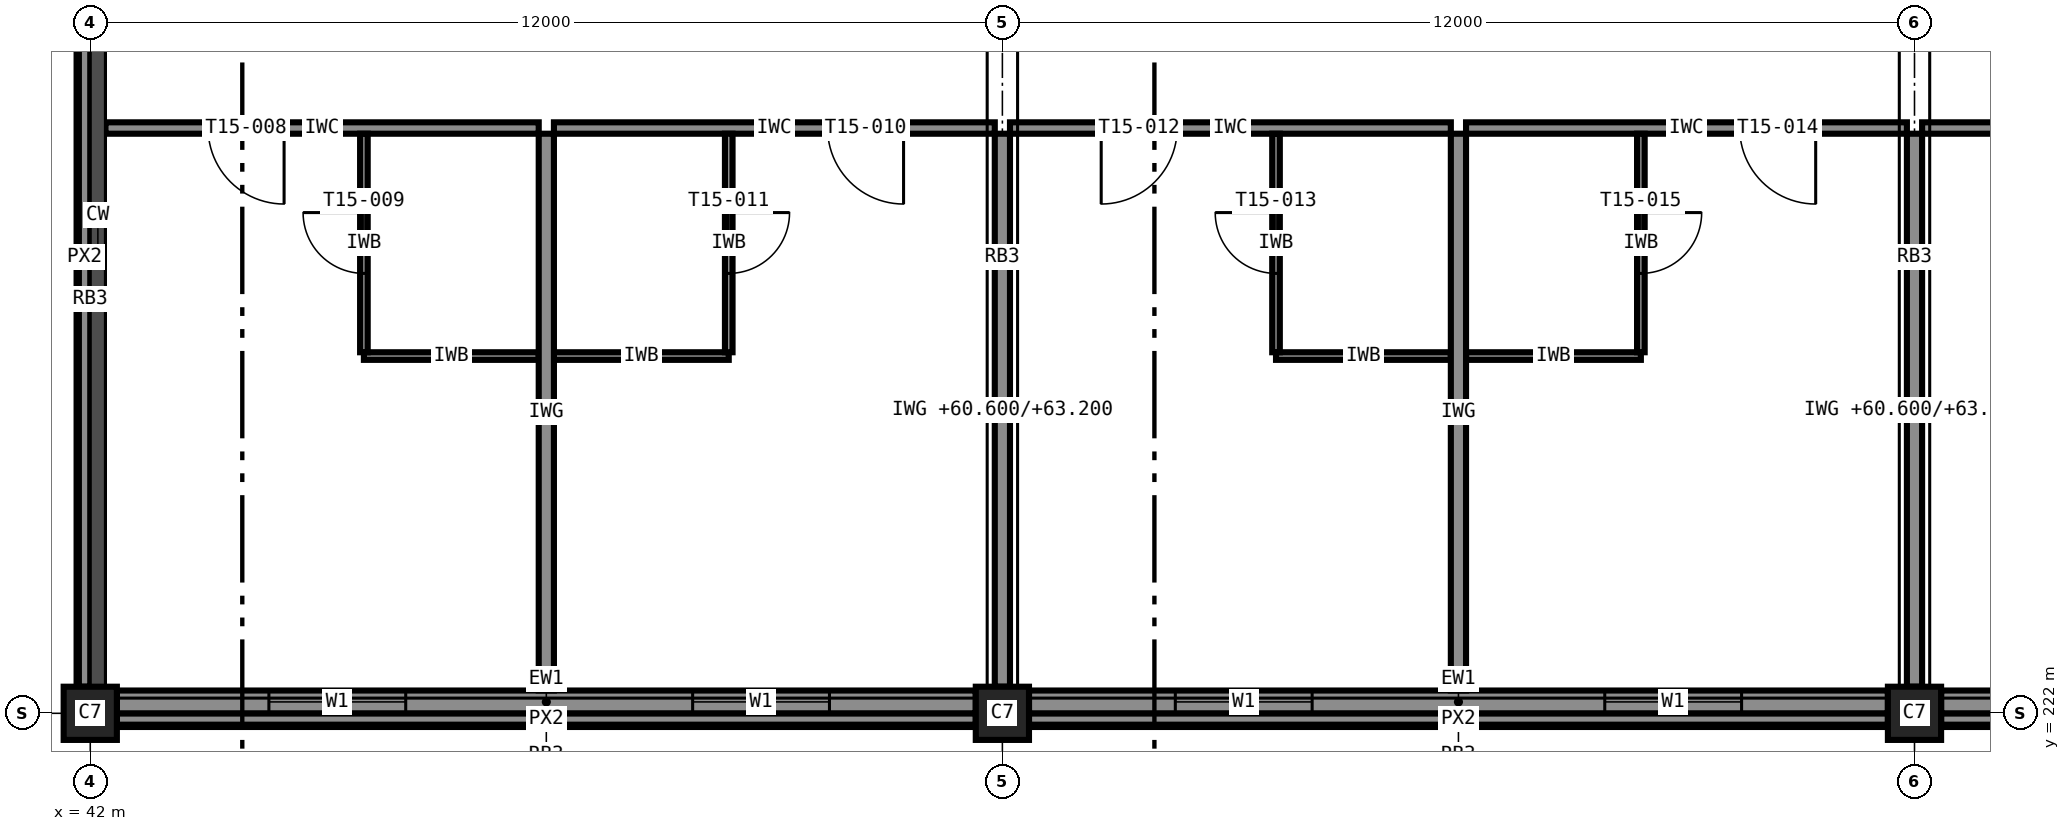
"""IFC4 building model, lengths in metres.
Left out: names, types, materials, properties, quantities, classifications, styles, units other than length and angle.
Written with IfcOpenShell. Run it as: python <this file> out.ifc"""

import sys

from ifc_helpers import new_model, si_unit, direction, frame, frame_2d, origin, origin_2d, place, context, subcontext, project, spatial, rectangle, extrude, element, fill, save


model = new_model("IFC4")
c1 = context("Model", 3, precision=1e-05, world=origin(), true_north=direction((0.0, 1.0)))
c2 = subcontext(c1, "Body", "Model", "MODEL_VIEW")
j1 = project(units=[si_unit("LENGTHUNIT", "METRE"), si_unit("PLANEANGLEUNIT", "RADIAN")], contexts=[c1])
p1 = place(None, origin())
s1 = spatial("IfcSite", under=j1, at=p1, CompositionType="ELEMENT")
p2 = place(p1, origin())
s2 = spatial("IfcBuilding", under=s1, at=p2, CompositionType="ELEMENT")
p3 = place(p2, frame((0.0, 0.0, 60.6)))
s3 = spatial("IfcBuildingStorey", under=s2, at=p3, CompositionType="ELEMENT", Elevation=60.6)
for number, where, z_axis, x_axis in (
    (1, (42.0, 222.0, 0.0), (0.0, 0.0, 1.0), (1.0, 0.0, 0.0)),
    (2, (54.0, 222.0, 0.0), (0.0, 0.0, 1.0), (1.0, 0.0, 0.0)),
    (3, (66.0, 222.0, 0.0), (0.0, 0.0, 1.0), (1.0, 0.0, 0.0)),
):
    element("IfcColumn", number, at=place(p3, frame(where, z_axis=z_axis, x_axis=x_axis)), inside=s3, PredefinedType="COLUMN", context=c2, shape_type="SweptSolid", body=[
        extrude(rectangle(XDim=0.7, YDim=0.7, at=origin_2d()), origin(), (0.0, 0.0, 1.0), 3.6),
    ])
p4 = place(p3, frame((42.35, 222.15, 0.0), z_axis=(0.0, 0.0, 1.0), x_axis=(1.0, 0.0, 0.0)))
e4 = element("IfcWall", 4, at=p4, inside=s3, PredefinedType="STANDARD", context=c2, shape_type="SweptSolid", body=[
    extrude(rectangle(XDim=11.3, YDim=0.3, at=frame_2d((5.65, 0.0))), origin(), (0.0, 0.0, 1.0), 2.6),
])
p5 = place(p4, frame((2.0, 0.0, 0.85)))
e5 = element("IfcOpeningElement", 5, at=p5, cuts=e4, PredefinedType="OPENING", context=c2, shape_type="SweptSolid", body=[
    extrude(rectangle(XDim=1.8, YDim=1.75, at=frame_2d((0.9, 0.875))), frame((0.0, 0.16, 0.0), z_axis=(0.0, -1.0, 0.0), x_axis=(1.0, 0.0, 0.0)), (0.0, 0.0, 1.0), 0.32),
])
p6 = place(p4, frame((7.575, 0.0, 0.85)))
e6 = element("IfcOpeningElement", 6, at=p6, cuts=e4, PredefinedType="OPENING", context=c2, shape_type="SweptSolid", body=[
    extrude(rectangle(XDim=1.8, YDim=1.75, at=frame_2d((0.9, 0.875))), frame((0.0, 0.16, 0.0), z_axis=(0.0, -1.0, 0.0), x_axis=(1.0, 0.0, 0.0)), (0.0, 0.0, 1.0), 0.32),
])
p7 = place(p3, frame((54.35, 222.15, 0.0), z_axis=(0.0, 0.0, 1.0), x_axis=(1.0, 0.0, 0.0)))
e7 = element("IfcWall", 7, at=p7, inside=s3, PredefinedType="STANDARD", context=c2, shape_type="SweptSolid", body=[
    extrude(rectangle(XDim=11.3, YDim=0.3, at=frame_2d((5.65, 0.0))), origin(), (0.0, 0.0, 1.0), 2.6),
])
p8 = place(p7, frame((1.925, 0.0, 0.85)))
e8 = element("IfcOpeningElement", 8, at=p8, cuts=e7, PredefinedType="OPENING", context=c2, shape_type="SweptSolid", body=[
    extrude(rectangle(XDim=1.8, YDim=1.75, at=frame_2d((0.9, 0.875))), frame((0.0, 0.16, 0.0), z_axis=(0.0, -1.0, 0.0), x_axis=(1.0, 0.0, 0.0)), (0.0, 0.0, 1.0), 0.32),
])
p9 = place(p7, frame((7.575, 0.0, 0.85)))
e9 = element("IfcOpeningElement", 9, at=p9, cuts=e7, PredefinedType="OPENING", context=c2, shape_type="SweptSolid", body=[
    extrude(rectangle(XDim=1.8, YDim=1.75, at=frame_2d((0.9, 0.875))), frame((0.0, 0.16, 0.0), z_axis=(0.0, -1.0, 0.0), x_axis=(1.0, 0.0, 0.0)), (0.0, 0.0, 1.0), 0.32),
])
p10 = place(p3, frame((66.35, 222.15, 0.0), z_axis=(0.0, 0.0, 1.0), x_axis=(1.0, 0.0, 0.0)))
e10 = element("IfcWall", 10, at=p10, inside=s3, PredefinedType="STANDARD", context=c2, shape_type="SweptSolid", body=[
    extrude(rectangle(XDim=11.3, YDim=0.3, at=frame_2d((5.65, 0.0))), origin(), (0.0, 0.0, 1.0), 2.6),
])
p11 = place(p10, frame((1.925, 0.0, 0.85)))
e11 = element("IfcOpeningElement", 11, at=p11, cuts=e10, PredefinedType="OPENING", context=c2, shape_type="SweptSolid", body=[
    extrude(rectangle(XDim=1.8, YDim=1.75, at=frame_2d((0.9, 0.875))), frame((0.0, 0.16, 0.0), z_axis=(0.0, -1.0, 0.0), x_axis=(1.0, 0.0, 0.0)), (0.0, 0.0, 1.0), 0.32),
])
p12 = place(p10, frame((7.575, 0.0, 0.85)))
e12 = element("IfcOpeningElement", 12, at=p12, cuts=e10, PredefinedType="OPENING", context=c2, shape_type="SweptSolid", body=[
    extrude(rectangle(XDim=1.8, YDim=1.75, at=frame_2d((0.9, 0.875))), frame((0.0, 0.16, 0.0), z_axis=(0.0, -1.0, 0.0), x_axis=(1.0, 0.0, 0.0)), (0.0, 0.0, 1.0), 0.32),
])
for number, where, z_axis, x_axis in (
    (13, (42.35, 221.925, 3.4), (0.0, 0.0, 1.0), (1.0, 0.0, 0.0)),
    (14, (54.35, 221.925, 3.4), (0.0, 0.0, 1.0), (1.0, 0.0, 0.0)),
    (15, (66.35, 221.925, 3.4), (0.0, 0.0, 1.0), (1.0, 0.0, 0.0)),
    (16, (41.925, 233.65, 3.4), (0.0, 0.0, 1.0), (0.0, -1.0, 0.0)),
):
    element("IfcWall", number, at=place(p3, frame(where, z_axis=z_axis, x_axis=x_axis)), inside=s3, PredefinedType="STANDARD", context=c2, shape_type="SweptSolid", body=[
        extrude(rectangle(XDim=11.3, YDim=0.15, at=frame_2d((5.65, 0.0))), origin(), (0.0, 0.0, 1.0), 0.2),
    ])
p13 = place(p3, frame((47.9, 229.7, 0.0), z_axis=(0.0, 0.0, 1.0), x_axis=(-1.0, 0.0, 0.0)))
e17 = element("IfcWall", 17, at=p13, inside=s3, PredefinedType="PARTITIONING", context=c2, shape_type="SweptSolid", body=[
    extrude(rectangle(XDim=5.7, YDim=0.15, at=frame_2d((2.85, 0.0))), origin(), (0.0, 0.0, 1.0), 3.4),
])
p14 = place(p13, frame((3.35, 0.0, 0.0)))
e18 = element("IfcOpeningElement", 18, at=p14, cuts=e17, PredefinedType="OPENING", context=c2, shape_type="SweptSolid", body=[
    extrude(rectangle(XDim=1.0, YDim=2.1, at=frame_2d((0.5, 1.05))), frame((0.0, 0.085, 0.0), z_axis=(0.0, -1.0, 0.0), x_axis=(1.0, 0.0, 0.0)), (0.0, 0.0, 1.0), 0.17),
])
p15 = place(p3, frame((45.6, 226.7, 0.0), z_axis=(0.0, 0.0, 1.0), x_axis=(1.0, 0.0, 0.0)))
e19 = element("IfcWall", 19, at=p15, inside=s3, PredefinedType="PARTITIONING", context=c2, shape_type="SweptSolid", body=[
    extrude(rectangle(XDim=2.3, YDim=0.1, at=frame_2d((1.15, 0.0))), origin(), (0.0, 0.0, 1.0), 3.4),
])
p16 = place(p3, frame((45.6, 226.75, 0.0), z_axis=(0.0, 0.0, 1.0), x_axis=(0.0, 1.0, 0.0)))
e20 = element("IfcWall", 20, at=p16, inside=s3, PredefinedType="PARTITIONING", context=c2, shape_type="SweptSolid", body=[
    extrude(rectangle(XDim=2.875, YDim=0.1, at=frame_2d((1.438, 0.0))), origin(), (0.0, 0.0, 1.0), 3.4),
])
p17 = place(p16, frame((1.038, 0.0, 0.0)))
e21 = element("IfcOpeningElement", 21, at=p17, cuts=e20, PredefinedType="OPENING", context=c2, shape_type="SweptSolid", body=[
    extrude(rectangle(XDim=0.8, YDim=2.1, at=frame_2d((0.4, 1.05))), frame((0.0, 0.06, 0.0), z_axis=(0.0, -1.0, 0.0), x_axis=(1.0, 0.0, 0.0)), (0.0, 0.0, 1.0), 0.12),
])
p18 = place(p3, frame((53.9, 229.7, 0.0), z_axis=(0.0, 0.0, 1.0), x_axis=(-1.0, 0.0, 0.0)))
e22 = element("IfcWall", 22, at=p18, inside=s3, PredefinedType="PARTITIONING", context=c2, shape_type="SweptSolid", body=[
    extrude(rectangle(XDim=5.8, YDim=0.15, at=frame_2d((2.9, 0.0))), origin(), (0.0, 0.0, 1.0), 3.4),
])
p19 = place(p18, frame((1.2, 0.0, 0.0)))
e23 = element("IfcOpeningElement", 23, at=p19, cuts=e22, PredefinedType="OPENING", context=c2, shape_type="SweptSolid", body=[
    extrude(rectangle(XDim=1.0, YDim=2.1, at=frame_2d((0.5, 1.05))), frame((0.0, 0.085, 0.0), z_axis=(0.0, -1.0, 0.0), x_axis=(1.0, 0.0, 0.0)), (0.0, 0.0, 1.0), 0.17),
])
p20 = place(p3, frame((48.1, 226.7, 0.0), z_axis=(0.0, 0.0, 1.0), x_axis=(1.0, 0.0, 0.0)))
e24 = element("IfcWall", 24, at=p20, inside=s3, PredefinedType="PARTITIONING", context=c2, shape_type="SweptSolid", body=[
    extrude(rectangle(XDim=2.3, YDim=0.1, at=frame_2d((1.15, 0.0))), origin(), (0.0, 0.0, 1.0), 3.4),
])
p21 = place(p3, frame((50.4, 229.625, 0.0), z_axis=(0.0, 0.0, 1.0), x_axis=(0.0, -1.0, 0.0)))
e25 = element("IfcWall", 25, at=p21, inside=s3, PredefinedType="PARTITIONING", context=c2, shape_type="SweptSolid", body=[
    extrude(rectangle(XDim=2.875, YDim=0.1, at=frame_2d((1.438, 0.0))), origin(), (0.0, 0.0, 1.0), 3.4),
])
p22 = place(p21, frame((1.038, 0.0, 0.0)))
e26 = element("IfcOpeningElement", 26, at=p22, cuts=e25, PredefinedType="OPENING", context=c2, shape_type="SweptSolid", body=[
    extrude(rectangle(XDim=0.8, YDim=2.1, at=frame_2d((0.4, 1.05))), frame((0.0, 0.06, 0.0), z_axis=(0.0, -1.0, 0.0), x_axis=(1.0, 0.0, 0.0)), (0.0, 0.0, 1.0), 0.12),
])
p23 = place(p3, frame((59.9, 229.7, 0.0), z_axis=(0.0, 0.0, 1.0), x_axis=(-1.0, 0.0, 0.0)))
e27 = element("IfcWall", 27, at=p23, inside=s3, PredefinedType="PARTITIONING", context=c2, shape_type="SweptSolid", body=[
    extrude(rectangle(XDim=5.8, YDim=0.15, at=frame_2d((2.9, 0.0))), origin(), (0.0, 0.0, 1.0), 3.4),
])
p24 = place(p23, frame((3.6, 0.0, 0.0)))
e28 = element("IfcOpeningElement", 28, at=p24, cuts=e27, PredefinedType="OPENING", context=c2, shape_type="SweptSolid", body=[
    extrude(rectangle(XDim=1.0, YDim=2.1, at=frame_2d((0.5, 1.05))), frame((0.0, 0.085, 0.0), z_axis=(0.0, -1.0, 0.0), x_axis=(1.0, 0.0, 0.0)), (0.0, 0.0, 1.0), 0.17),
])
p25 = place(p3, frame((57.6, 226.7, 0.0), z_axis=(0.0, 0.0, 1.0), x_axis=(1.0, 0.0, 0.0)))
e29 = element("IfcWall", 29, at=p25, inside=s3, PredefinedType="PARTITIONING", context=c2, shape_type="SweptSolid", body=[
    extrude(rectangle(XDim=2.3, YDim=0.1, at=frame_2d((1.15, 0.0))), origin(), (0.0, 0.0, 1.0), 3.4),
])
p26 = place(p3, frame((57.6, 226.75, 0.0), z_axis=(0.0, 0.0, 1.0), x_axis=(0.0, 1.0, 0.0)))
e30 = element("IfcWall", 30, at=p26, inside=s3, PredefinedType="PARTITIONING", context=c2, shape_type="SweptSolid", body=[
    extrude(rectangle(XDim=2.875, YDim=0.1, at=frame_2d((1.438, 0.0))), origin(), (0.0, 0.0, 1.0), 3.4),
])
p27 = place(p26, frame((1.038, 0.0, 0.0)))
e31 = element("IfcOpeningElement", 31, at=p27, cuts=e30, PredefinedType="OPENING", context=c2, shape_type="SweptSolid", body=[
    extrude(rectangle(XDim=0.8, YDim=2.1, at=frame_2d((0.4, 1.05))), frame((0.0, 0.06, 0.0), z_axis=(0.0, -1.0, 0.0), x_axis=(1.0, 0.0, 0.0)), (0.0, 0.0, 1.0), 0.12),
])
p28 = place(p3, frame((65.9, 229.7, 0.0), z_axis=(0.0, 0.0, 1.0), x_axis=(-1.0, 0.0, 0.0)))
e32 = element("IfcWall", 32, at=p28, inside=s3, PredefinedType="PARTITIONING", context=c2, shape_type="SweptSolid", body=[
    extrude(rectangle(XDim=5.8, YDim=0.15, at=frame_2d((2.9, 0.0))), origin(), (0.0, 0.0, 1.0), 3.4),
])
p29 = place(p28, frame((1.2, 0.0, 0.0)))
e33 = element("IfcOpeningElement", 33, at=p29, cuts=e32, PredefinedType="OPENING", context=c2, shape_type="SweptSolid", body=[
    extrude(rectangle(XDim=1.0, YDim=2.1, at=frame_2d((0.5, 1.05))), frame((0.0, 0.085, 0.0), z_axis=(0.0, -1.0, 0.0), x_axis=(1.0, 0.0, 0.0)), (0.0, 0.0, 1.0), 0.17),
])
p30 = place(p3, frame((60.1, 226.7, 0.0), z_axis=(0.0, 0.0, 1.0), x_axis=(1.0, 0.0, 0.0)))
e34 = element("IfcWall", 34, at=p30, inside=s3, PredefinedType="PARTITIONING", context=c2, shape_type="SweptSolid", body=[
    extrude(rectangle(XDim=2.3, YDim=0.1, at=frame_2d((1.15, 0.0))), origin(), (0.0, 0.0, 1.0), 3.4),
])
p31 = place(p3, frame((62.4, 229.625, 0.0), z_axis=(0.0, 0.0, 1.0), x_axis=(0.0, -1.0, 0.0)))
e35 = element("IfcWall", 35, at=p31, inside=s3, PredefinedType="PARTITIONING", context=c2, shape_type="SweptSolid", body=[
    extrude(rectangle(XDim=2.875, YDim=0.1, at=frame_2d((1.438, 0.0))), origin(), (0.0, 0.0, 1.0), 3.4),
])
p32 = place(p31, frame((1.038, 0.0, 0.0)))
e36 = element("IfcOpeningElement", 36, at=p32, cuts=e35, PredefinedType="OPENING", context=c2, shape_type="SweptSolid", body=[
    extrude(rectangle(XDim=0.8, YDim=2.1, at=frame_2d((0.4, 1.05))), frame((0.0, 0.06, 0.0), z_axis=(0.0, -1.0, 0.0), x_axis=(1.0, 0.0, 0.0)), (0.0, 0.0, 1.0), 0.12),
])
p33 = place(p3, frame((71.9, 229.7, 0.0), z_axis=(0.0, 0.0, 1.0), x_axis=(-1.0, 0.0, 0.0)))
e37 = element("IfcWall", 37, at=p33, inside=s3, PredefinedType="PARTITIONING", context=c2, shape_type="SweptSolid", body=[
    extrude(rectangle(XDim=5.8, YDim=0.15, at=frame_2d((2.9, 0.0))), origin(), (0.0, 0.0, 1.0), 3.4),
])
p34 = place(p33, frame((3.6, 0.0, 0.0)))
e38 = element("IfcOpeningElement", 38, at=p34, cuts=e37, PredefinedType="OPENING", context=c2, shape_type="SweptSolid", body=[
    extrude(rectangle(XDim=1.0, YDim=2.1, at=frame_2d((0.5, 1.05))), frame((0.0, 0.085, 0.0), z_axis=(0.0, -1.0, 0.0), x_axis=(1.0, 0.0, 0.0)), (0.0, 0.0, 1.0), 0.17),
])
p35 = place(p3, frame((48.0, 222.3, 0.0), z_axis=(0.0, 0.0, 1.0), x_axis=(0.0, 1.0, 0.0)))
e39 = element("IfcWall", 39, at=p35, inside=s3, PredefinedType="PARTITIONING", context=c2, shape_type="SweptSolid", body=[
    extrude(rectangle(XDim=7.325, YDim=0.2, at=frame_2d((3.663, 0.0))), origin(), (0.0, 0.0, 1.0), 3.4),
])
p36 = place(p3, frame((54.0, 222.35, 0.0), z_axis=(0.0, 0.0, 1.0), x_axis=(0.0, 1.0, 0.0)))
e40 = element("IfcWall", 40, at=p36, inside=s3, PredefinedType="PARTITIONING", context=c2, shape_type="SweptSolid", body=[
    extrude(rectangle(XDim=7.275, YDim=0.2, at=frame_2d((3.637, 0.0))), origin(), (0.0, 0.0, 1.0), 2.6),
])
p37 = place(p3, frame((60.0, 222.3, 0.0), z_axis=(0.0, 0.0, 1.0), x_axis=(0.0, 1.0, 0.0)))
e41 = element("IfcWall", 41, at=p37, inside=s3, PredefinedType="PARTITIONING", context=c2, shape_type="SweptSolid", body=[
    extrude(rectangle(XDim=7.325, YDim=0.2, at=frame_2d((3.663, 0.0))), origin(), (0.0, 0.0, 1.0), 3.4),
])
p38 = place(p3, frame((66.0, 222.35, 0.0), z_axis=(0.0, 0.0, 1.0), x_axis=(0.0, 1.0, 0.0)))
e42 = element("IfcWall", 42, at=p38, inside=s3, PredefinedType="PARTITIONING", context=c2, shape_type="SweptSolid", body=[
    extrude(rectangle(XDim=7.275, YDim=0.2, at=frame_2d((3.637, 0.0))), origin(), (0.0, 0.0, 1.0), 2.6),
])
p39 = place(p5, origin())
e43 = element("IfcWindow", 43, at=p39, inside=s3, PartitioningType="SINGLE_PANEL", PredefinedType="WINDOW", context=c2, shape_type="SweptSolid", body=[
    extrude(rectangle(XDim=1.8, YDim=1.75, at=frame_2d((0.9, 0.875))), frame((0.0, 0.03, 0.0), z_axis=(0.0, -1.0, 0.0), x_axis=(1.0, 0.0, 0.0)), (0.0, 0.0, 1.0), 0.06),
])
fill(e5, e43)
p40 = place(p6, origin())
e44 = element("IfcWindow", 44, at=p40, inside=s3, PartitioningType="SINGLE_PANEL", PredefinedType="WINDOW", context=c2, shape_type="SweptSolid", body=[
    extrude(rectangle(XDim=1.8, YDim=1.75, at=frame_2d((0.9, 0.875))), frame((0.0, 0.03, 0.0), z_axis=(0.0, -1.0, 0.0), x_axis=(1.0, 0.0, 0.0)), (0.0, 0.0, 1.0), 0.06),
])
fill(e6, e44)
p41 = place(p8, origin())
e45 = element("IfcWindow", 45, at=p41, inside=s3, PartitioningType="SINGLE_PANEL", PredefinedType="WINDOW", context=c2, shape_type="SweptSolid", body=[
    extrude(rectangle(XDim=1.8, YDim=1.75, at=frame_2d((0.9, 0.875))), frame((0.0, 0.03, 0.0), z_axis=(0.0, -1.0, 0.0), x_axis=(1.0, 0.0, 0.0)), (0.0, 0.0, 1.0), 0.06),
])
fill(e8, e45)
p42 = place(p9, origin())
e46 = element("IfcWindow", 46, at=p42, inside=s3, PartitioningType="SINGLE_PANEL", PredefinedType="WINDOW", context=c2, shape_type="SweptSolid", body=[
    extrude(rectangle(XDim=1.8, YDim=1.75, at=frame_2d((0.9, 0.875))), frame((0.0, 0.03, 0.0), z_axis=(0.0, -1.0, 0.0), x_axis=(1.0, 0.0, 0.0)), (0.0, 0.0, 1.0), 0.06),
])
fill(e9, e46)
p43 = place(p14, origin())
e47 = element("IfcDoor", 47, at=p43, inside=s3, OperationType="SINGLE_SWING_LEFT", PredefinedType="DOOR", context=c2, shape_type="SweptSolid", body=[
    extrude(rectangle(XDim=1.0, YDim=2.1, at=frame_2d((0.5, 1.05))), frame((0.0, 0.025, 0.0), z_axis=(0.0, -1.0, 0.0), x_axis=(1.0, 0.0, 0.0)), (0.0, 0.0, 1.0), 0.05),
])
fill(e18, e47)
p44 = place(p17, origin())
e48 = element("IfcDoor", 48, at=p44, inside=s3, OperationType="SINGLE_SWING_RIGHT", PredefinedType="DOOR", context=c2, shape_type="SweptSolid", body=[
    extrude(rectangle(XDim=0.8, YDim=2.1, at=frame_2d((0.4, 1.05))), frame((0.0, 0.025, 0.0), z_axis=(0.0, -1.0, 0.0), x_axis=(1.0, 0.0, 0.0)), (0.0, 0.0, 1.0), 0.05),
])
fill(e21, e48)
p45 = place(p19, origin())
e49 = element("IfcDoor", 49, at=p45, inside=s3, OperationType="SINGLE_SWING_LEFT", PredefinedType="DOOR", context=c2, shape_type="SweptSolid", body=[
    extrude(rectangle(XDim=1.0, YDim=2.1, at=frame_2d((0.5, 1.05))), frame((0.0, 0.025, 0.0), z_axis=(0.0, -1.0, 0.0), x_axis=(1.0, 0.0, 0.0)), (0.0, 0.0, 1.0), 0.05),
])
fill(e23, e49)
p46 = place(p22, origin())
e50 = element("IfcDoor", 50, at=p46, inside=s3, OperationType="SINGLE_SWING_LEFT", PredefinedType="DOOR", context=c2, shape_type="SweptSolid", body=[
    extrude(rectangle(XDim=0.8, YDim=2.1, at=frame_2d((0.4, 1.05))), frame((0.0, 0.025, 0.0), z_axis=(0.0, -1.0, 0.0), x_axis=(1.0, 0.0, 0.0)), (0.0, 0.0, 1.0), 0.05),
])
fill(e26, e50)
p47 = place(p24, origin())
e51 = element("IfcDoor", 51, at=p47, inside=s3, OperationType="SINGLE_SWING_RIGHT", PredefinedType="DOOR", context=c2, shape_type="SweptSolid", body=[
    extrude(rectangle(XDim=1.0, YDim=2.1, at=frame_2d((0.5, 1.05))), frame((0.0, 0.025, 0.0), z_axis=(0.0, -1.0, 0.0), x_axis=(1.0, 0.0, 0.0)), (0.0, 0.0, 1.0), 0.05),
])
fill(e28, e51)
p48 = place(p27, origin())
e52 = element("IfcDoor", 52, at=p48, inside=s3, OperationType="SINGLE_SWING_RIGHT", PredefinedType="DOOR", context=c2, shape_type="SweptSolid", body=[
    extrude(rectangle(XDim=0.8, YDim=2.1, at=frame_2d((0.4, 1.05))), frame((0.0, 0.025, 0.0), z_axis=(0.0, -1.0, 0.0), x_axis=(1.0, 0.0, 0.0)), (0.0, 0.0, 1.0), 0.05),
])
fill(e31, e52)
p49 = place(p29, origin())
e53 = element("IfcDoor", 53, at=p49, inside=s3, OperationType="SINGLE_SWING_LEFT", PredefinedType="DOOR", context=c2, shape_type="SweptSolid", body=[
    extrude(rectangle(XDim=1.0, YDim=2.1, at=frame_2d((0.5, 1.05))), frame((0.0, 0.025, 0.0), z_axis=(0.0, -1.0, 0.0), x_axis=(1.0, 0.0, 0.0)), (0.0, 0.0, 1.0), 0.05),
])
fill(e33, e53)
p50 = place(p32, origin())
e54 = element("IfcDoor", 54, at=p50, inside=s3, OperationType="SINGLE_SWING_LEFT", PredefinedType="DOOR", context=c2, shape_type="SweptSolid", body=[
    extrude(rectangle(XDim=0.8, YDim=2.1, at=frame_2d((0.4, 1.05))), frame((0.0, 0.025, 0.0), z_axis=(0.0, -1.0, 0.0), x_axis=(1.0, 0.0, 0.0)), (0.0, 0.0, 1.0), 0.05),
])
fill(e36, e54)
save(model, sys.argv[1])
